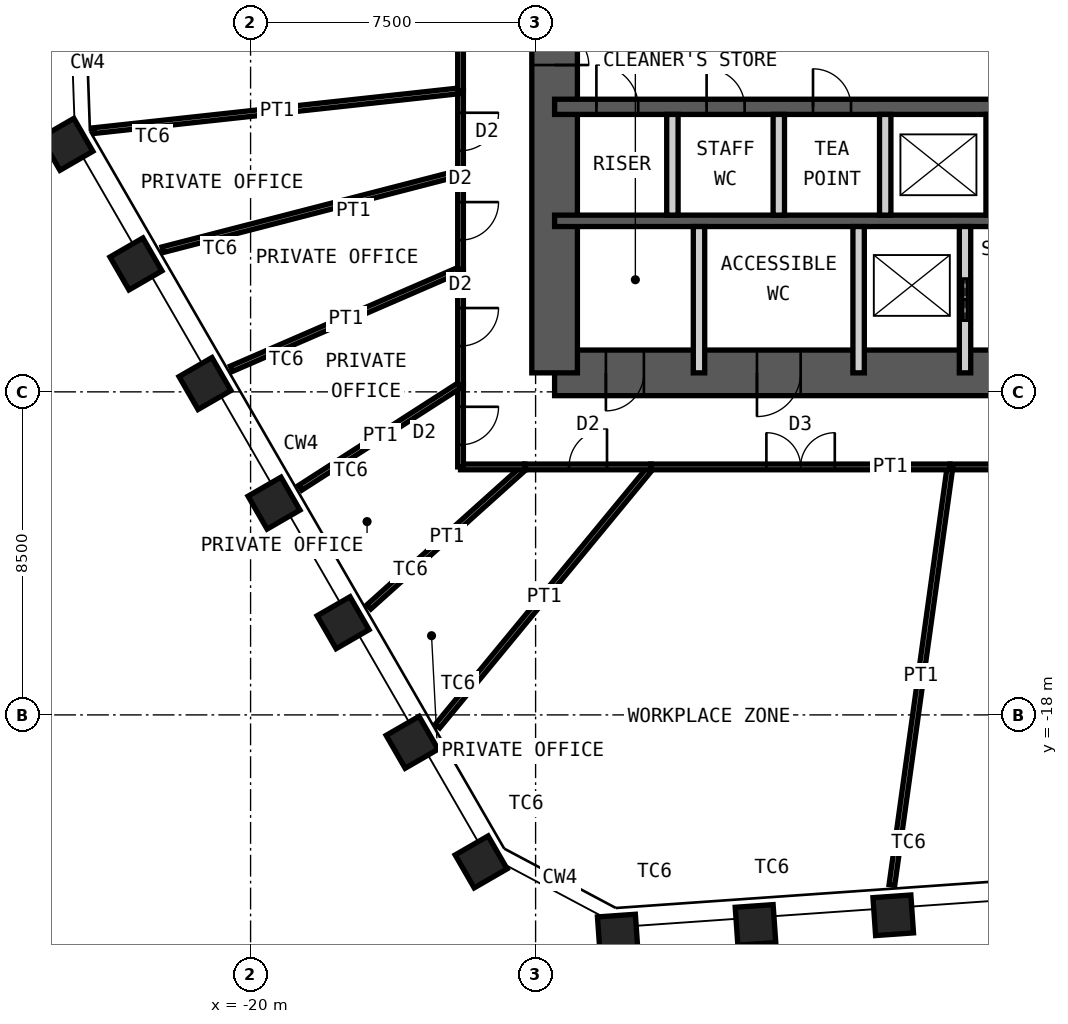
"""IFC4 building model, lengths in metres.
Left out: names, types, materials, properties, quantities, classifications, styles, units other than length and angle.
Written with IfcOpenShell. Run it as: python <this file> out.ifc"""

import sys

from ifc_helpers import new_model, si_unit, direction, frame, frame_2d, origin, origin_2d, place, context, subcontext, project, spatial, rectangle, hollow_rectangle, extrude, element, fill, save


model = new_model("IFC4")
c1 = context("Model", 3, precision=1e-05, world=origin(), true_north=direction((0.0, 1.0)))
c2 = subcontext(c1, "Body", "Model", "MODEL_VIEW")
j1 = project(units=[si_unit("LENGTHUNIT", "METRE"), si_unit("PLANEANGLEUNIT", "RADIAN")], contexts=[c1])
p1 = place(None, origin())
s1 = spatial("IfcSite", under=j1, at=p1, CompositionType="ELEMENT")
p2 = place(p1, origin())
s2 = spatial("IfcBuilding", under=s1, at=p2, CompositionType="ELEMENT")
p3 = place(p2, frame((0.0, 0.0, 239.2)))
s3 = spatial("IfcBuildingStorey", under=s2, at=p3, CompositionType="ELEMENT", Elevation=239.2)
for number, where, z_axis, x_axis in (
    (1, (-3.089, -23.272, 0.0), (0.0, 0.0, 1.0), (0.998, 0.07, 0.0)),
    (2, (-6.714, -23.526, 0.0), (0.0, 0.0, 1.0), (0.998, 0.07, 0.0)),
    (3, (-10.338, -23.779, 0.0), (0.0, 0.0, 1.0), (0.998, 0.07, 0.0)),
    (4, (-13.933, -21.868, 0.0), (0.0, 0.0, 1.0), (0.5, -0.866, 0.0)),
    (5, (-15.749, -18.721, 0.0), (0.0, 0.0, 1.0), (0.5, -0.866, 0.0)),
    (6, (-17.566, -15.574, 0.0), (0.0, 0.0, 1.0), (0.5, -0.866, 0.0)),
    (7, (-19.383, -12.428, 0.0), (0.0, 0.0, 1.0), (0.5, -0.866, 0.0)),
    (8, (-21.2, -9.281, 0.0), (0.0, 0.0, 1.0), (0.5, -0.866, 0.0)),
    (9, (-23.016, -6.134, 0.0), (0.0, 0.0, 1.0), (0.5, -0.866, 0.0)),
    (10, (-24.833, -2.988, 0.0), (0.0, 0.0, 1.0), (0.5, -0.866, 0.0)),
):
    element("IfcColumn", number, at=place(p3, frame(where, z_axis=z_axis, x_axis=x_axis)), inside=s3, PredefinedType="COLUMN", context=c2, shape_type="SweptSolid", body=[
        extrude(hollow_rectangle(XDim=1.0, YDim=1.0, WallThickness=0.06, at=origin_2d()), origin(), (0.0, 0.0, 1.0), 4.2),
    ])
p4 = place(p3, frame((-12.0, -9.0, 0.0), z_axis=(0.0, 0.0, 1.0), x_axis=(1.0, 0.0, 0.0)))
e11 = element("IfcWall", 11, at=p4, inside=s3, PredefinedType="SHEAR", context=c2, shape_type="SweptSolid", body=[
    extrude(rectangle(XDim=24.0, YDim=1.2, at=frame_2d((12.0, 0.0))), origin(), (0.0, 0.0, 1.0), 4.2),
])
p5 = place(p4, frame((1.35, 0.0, 0.0)))
e12 = element("IfcOpeningElement", 12, at=p5, cuts=e11, PredefinedType="OPENING", context=c2, shape_type="SweptSolid", body=[
    extrude(rectangle(XDim=1.0, YDim=2.1, at=frame_2d((0.5, 1.05))), frame((0.0, 0.61, 0.0), z_axis=(0.0, -1.0, 0.0), x_axis=(1.0, 0.0, 0.0)), (0.0, 0.0, 1.0), 1.22),
])
p6 = place(p4, frame((5.325, 0.0, 0.0)))
e13 = element("IfcOpeningElement", 13, at=p6, cuts=e11, PredefinedType="OPENING", context=c2, shape_type="SweptSolid", body=[
    extrude(rectangle(XDim=1.15, YDim=2.1, at=frame_2d((0.575, 1.05))), frame((0.0, 0.61, 0.0), z_axis=(0.0, -1.0, 0.0), x_axis=(1.0, 0.0, 0.0)), (0.0, 0.0, 1.0), 1.22),
])
p7 = place(p4, frame((12.6, 0.0, 0.0)))
e14 = element("IfcOpeningElement", 14, at=p7, cuts=e11, PredefinedType="OPENING", context=c2, shape_type="SweptSolid", body=[
    extrude(rectangle(XDim=1.0, YDim=2.1, at=frame_2d((0.5, 1.05))), frame((0.0, 0.61, 0.0), z_axis=(0.0, -1.0, 0.0), x_axis=(1.0, 0.0, 0.0)), (0.0, 0.0, 1.0), 1.22),
])
p8 = place(p3, frame((-12.0, -9.0, 0.0), z_axis=(0.0, 0.0, 1.0), x_axis=(0.0, 1.0, 0.0)))
e15 = element("IfcWall", 15, at=p8, inside=s3, PredefinedType="SHEAR", context=c2, shape_type="SweptSolid", body=[
    extrude(rectangle(XDim=18.0, YDim=1.2, at=frame_2d((9.0, 0.0))), origin(), (0.0, 0.0, 1.0), 4.2),
])
p9 = place(p8, frame((8.1, 0.0, 0.0)))
e16 = element("IfcOpeningElement", 16, at=p9, cuts=e15, PredefinedType="OPENING", context=c2, shape_type="SweptSolid", body=[
    extrude(rectangle(XDim=1.8, YDim=2.1, at=frame_2d((0.9, 1.05))), frame((0.0, 0.61, 0.0), z_axis=(0.0, -1.0, 0.0), x_axis=(1.0, 0.0, 0.0)), (0.0, 0.0, 1.0), 1.22),
])
p10 = place(p3, frame((-12.0, -2.0, 0.0), z_axis=(0.0, 0.0, 1.0), x_axis=(1.0, 0.0, 0.0)))
e17 = element("IfcWall", 17, at=p10, inside=s3, PredefinedType="SHEAR", context=c2, shape_type="SweptSolid", body=[
    extrude(rectangle(XDim=24.0, YDim=0.4, at=frame_2d((12.0, 0.0))), origin(), (0.0, 0.0, 1.0), 4.2),
])
p11 = place(p10, frame((1.1, 0.0, 0.0)))
e18 = element("IfcOpeningElement", 18, at=p11, cuts=e17, PredefinedType="OPENING", context=c2, shape_type="SweptSolid", body=[
    extrude(rectangle(XDim=1.1, YDim=2.1, at=frame_2d((0.55, 1.05))), frame((0.0, 0.21, 0.0), z_axis=(0.0, -1.0, 0.0), x_axis=(1.0, 0.0, 0.0)), (0.0, 0.0, 1.0), 0.42),
])
p12 = place(p10, frame((13.55, 0.0, 0.0)))
e19 = element("IfcOpeningElement", 19, at=p12, cuts=e17, PredefinedType="OPENING", context=c2, shape_type="SweptSolid", body=[
    extrude(rectangle(XDim=1.1, YDim=2.1, at=frame_2d((0.55, 1.05))), frame((0.0, 0.21, 0.0), z_axis=(0.0, -1.0, 0.0), x_axis=(1.0, 0.0, 0.0)), (0.0, 0.0, 1.0), 0.42),
])
p13 = place(p10, frame((20.7, 0.0, 0.0)))
e20 = element("IfcOpeningElement", 20, at=p13, cuts=e17, PredefinedType="OPENING", context=c2, shape_type="SweptSolid", body=[
    extrude(rectangle(XDim=1.1, YDim=2.1, at=frame_2d((0.55, 1.05))), frame((0.0, 0.21, 0.0), z_axis=(0.0, -1.0, 0.0), x_axis=(1.0, 0.0, 0.0)), (0.0, 0.0, 1.0), 0.42),
])
p14 = place(p10, frame((4.0, 0.0, 0.0)))
e21 = element("IfcOpeningElement", 21, at=p14, cuts=e17, PredefinedType="OPENING", context=c2, shape_type="SweptSolid", body=[
    extrude(rectangle(XDim=1.0, YDim=2.1, at=frame_2d((0.5, 1.05))), frame((0.0, 0.21, 0.0), z_axis=(0.0, -1.0, 0.0), x_axis=(1.0, 0.0, 0.0)), (0.0, 0.0, 1.0), 0.42),
])
p15 = place(p10, frame((6.8, 0.0, 0.0)))
e22 = element("IfcOpeningElement", 22, at=p15, cuts=e17, PredefinedType="OPENING", context=c2, shape_type="SweptSolid", body=[
    extrude(rectangle(XDim=1.0, YDim=2.1, at=frame_2d((0.5, 1.05))), frame((0.0, 0.21, 0.0), z_axis=(0.0, -1.0, 0.0), x_axis=(1.0, 0.0, 0.0)), (0.0, 0.0, 1.0), 0.42),
])
p16 = place(p3, frame((-12.0, -5.0, 0.0), z_axis=(0.0, 0.0, 1.0), x_axis=(1.0, 0.0, 0.0)))
e23 = element("IfcWall", 23, at=p16, inside=s3, PredefinedType="SHEAR", context=c2, shape_type="SweptSolid", body=[
    extrude(rectangle(XDim=24.0, YDim=0.3, at=frame_2d((12.0, 0.0))), origin(), (0.0, 0.0, 1.0), 4.2),
])
for number, where, z_axis, x_axis in (
    (24, (-8.9, -4.85, 0.0), (0.0, 0.0, 1.0), (0.0, 1.0, 0.0)),
    (25, (-6.1, -4.85, 0.0), (0.0, 0.0, 1.0), (0.0, 1.0, 0.0)),
    (26, (-3.3, -4.85, 0.0), (0.0, 0.0, 1.0), (0.0, 1.0, 0.0)),
    (27, (-0.5, -4.85, 0.0), (0.0, 0.0, 1.0), (0.0, 1.0, 0.0)),
):
    element("IfcWall", number, at=place(p3, frame(where, z_axis=z_axis, x_axis=x_axis)), inside=s3, PredefinedType="PARTITIONING", context=c2, shape_type="SweptSolid", body=[
        extrude(rectangle(XDim=2.65, YDim=0.3, at=frame_2d((1.325, 0.0))), origin(), (0.0, 0.0, 1.0), 3.98),
    ])
for number, where, z_axis, x_axis in (
    (28, (-8.2, -9.0, 0.0), (0.0, 0.0, 1.0), (0.0, 1.0, 0.0)),
    (29, (-4.0, -9.0, 0.0), (0.0, 0.0, 1.0), (0.0, 1.0, 0.0)),
):
    element("IfcWall", number, at=place(p3, frame(where, z_axis=z_axis, x_axis=x_axis)), inside=s3, PredefinedType="PARTITIONING", context=c2, shape_type="SweptSolid", body=[
        extrude(rectangle(XDim=3.85, YDim=0.3, at=frame_2d((1.925, 0.0))), origin(), (0.0, 0.0, 1.0), 3.98),
    ])
p17 = place(p3, frame((-1.2, -9.0, 0.0), z_axis=(0.0, 0.0, 1.0), x_axis=(0.0, 1.0, 0.0)))
e30 = element("IfcWall", 30, at=p17, inside=s3, PredefinedType="PARTITIONING", context=c2, shape_type="SweptSolid", body=[
    extrude(rectangle(XDim=3.85, YDim=0.3, at=frame_2d((1.925, 0.0))), origin(), (0.0, 0.0, 1.0), 3.98),
])
p18 = place(p17, frame((1.375, 0.0, 0.0)))
e31 = element("IfcOpeningElement", 31, at=p18, cuts=e30, PredefinedType="OPENING", context=c2, shape_type="SweptSolid", body=[
    extrude(rectangle(XDim=1.1, YDim=2.4, at=frame_2d((0.55, 1.2))), frame((0.0, 0.16, 0.0), z_axis=(0.0, -1.0, 0.0), x_axis=(1.0, 0.0, 0.0)), (0.0, 0.0, 1.0), 0.32),
])
p19 = place(p3, frame((-15.08, -18.294, 0.0), z_axis=(0.0, 0.0, 1.0), x_axis=(0.636052894953, 0.771645459277, 0.0)))
e32 = element("IfcWall", 32, at=p19, inside=s3, PredefinedType="PARTITIONING", context=c2, shape_type="SweptSolid", body=[
    extrude(rectangle(XDim=8.837, YDim=0.15, at=frame_2d((4.418, 0.0))), origin(), (0.0, 0.0, 1.0), 3.43),
])
p20 = place(p3, frame((-9.459, -11.475, 0.0), z_axis=(0.0, 0.0, 1.0), x_axis=(-1.0, 0.0, 0.0)))
e33 = element("IfcWall", 33, at=p20, inside=s3, PredefinedType="PARTITIONING", context=c2, shape_type="SweptSolid", body=[
    extrude(rectangle(XDim=3.324, YDim=0.15, at=frame_2d((1.662, 0.0))), origin(), (0.0, 0.0, 1.0), 4.03),
])
p21 = place(p20, frame((1.162, 0.0, 0.0)))
e34 = element("IfcOpeningElement", 34, at=p21, cuts=e33, PredefinedType="OPENING", context=c2, shape_type="SweptSolid", body=[
    extrude(rectangle(XDim=1.0, YDim=2.4, at=frame_2d((0.5, 1.2))), frame((0.0, 0.085, 0.0), z_axis=(0.0, -1.0, 0.0), x_axis=(1.0, 0.0, 0.0)), (0.0, 0.0, 1.0), 0.17),
])
p22 = place(p3, frame((-16.885, -15.158, 0.0), z_axis=(0.0, 0.0, 1.0), x_axis=(0.744165513773, 0.667995275515, 0.0)))
e35 = element("IfcWall", 35, at=p22, inside=s3, PredefinedType="PARTITIONING", context=c2, shape_type="SweptSolid", body=[
    extrude(rectangle(XDim=5.513, YDim=0.15, at=frame_2d((2.756, 0.0))), origin(), (0.0, 0.0, 1.0), 3.43),
])
p23 = place(p3, frame((-12.783, -11.475, 0.0), z_axis=(0.0, 0.0, 1.0), x_axis=(-1.0, 0.0, 0.0)))
e36 = element("IfcWall", 36, at=p23, inside=s3, PredefinedType="PARTITIONING", context=c2, shape_type="SweptSolid", body=[
    extrude(rectangle(XDim=1.692, YDim=0.15, at=frame_2d((0.846, 0.0))), origin(), (0.0, 0.0, 1.0), 4.03),
])
p24 = place(p3, frame((-14.475, -11.475, 0.0), z_axis=(0.0, 0.0, 1.0), x_axis=(0.0, 1.0, 0.0)))
e37 = element("IfcWall", 37, at=p24, inside=s3, PredefinedType="PARTITIONING", context=c2, shape_type="SweptSolid", body=[
    extrude(rectangle(XDim=2.164, YDim=0.15, at=frame_2d((1.082, 0.0))), origin(), (0.0, 0.0, 1.0), 4.03),
])
p25 = place(p24, frame((0.582, 0.0, 0.0)))
e38 = element("IfcOpeningElement", 38, at=p25, cuts=e37, PredefinedType="OPENING", context=c2, shape_type="SweptSolid", body=[
    extrude(rectangle(XDim=1.0, YDim=2.4, at=frame_2d((0.5, 1.2))), frame((0.0, 0.085, 0.0), z_axis=(0.0, -1.0, 0.0), x_axis=(1.0, 0.0, 0.0)), (0.0, 0.0, 1.0), 0.17),
])
p26 = place(p3, frame((-18.693, -12.024, 0.0), z_axis=(0.0, 0.0, 1.0), x_axis=(0.841031335058, 0.540986407824, 0.0)))
e39 = element("IfcWall", 39, at=p26, inside=s3, PredefinedType="PARTITIONING", context=c2, shape_type="SweptSolid", body=[
    extrude(rectangle(XDim=5.015, YDim=0.15, at=frame_2d((2.507, 0.0))), origin(), (0.0, 0.0, 1.0), 3.43),
])
p27 = place(p3, frame((-14.475, -9.311, 0.0), z_axis=(0.0, 0.0, 1.0), x_axis=(0.0, 1.0, 0.0)))
e40 = element("IfcWall", 40, at=p27, inside=s3, PredefinedType="PARTITIONING", context=c2, shape_type="SweptSolid", body=[
    extrude(rectangle(XDim=3.033, YDim=0.15, at=frame_2d((1.517, 0.0))), origin(), (0.0, 0.0, 1.0), 4.03),
])
p28 = place(p27, frame((1.017, 0.0, 0.0)))
e41 = element("IfcOpeningElement", 41, at=p28, cuts=e40, PredefinedType="OPENING", context=c2, shape_type="SweptSolid", body=[
    extrude(rectangle(XDim=1.0, YDim=2.4, at=frame_2d((0.5, 1.2))), frame((0.0, 0.085, 0.0), z_axis=(0.0, -1.0, 0.0), x_axis=(1.0, 0.0, 0.0)), (0.0, 0.0, 1.0), 0.17),
])
p29 = place(p3, frame((-20.502, -8.891, 0.0), z_axis=(0.0, 0.0, 1.0), x_axis=(0.917431289744, 0.397894242982, 0.0)))
e42 = element("IfcWall", 42, at=p29, inside=s3, PredefinedType="PARTITIONING", context=c2, shape_type="SweptSolid", body=[
    extrude(rectangle(XDim=6.569, YDim=0.15, at=frame_2d((3.285, 0.0))), origin(), (0.0, 0.0, 1.0), 3.43),
])
p30 = place(p3, frame((-14.475, -6.278, 0.0), z_axis=(0.0, 0.0, 1.0), x_axis=(0.0, 1.0, 0.0)))
e43 = element("IfcWall", 43, at=p30, inside=s3, PredefinedType="PARTITIONING", context=c2, shape_type="SweptSolid", body=[
    extrude(rectangle(XDim=2.542, YDim=0.15, at=frame_2d((1.271, 0.0))), origin(), (0.0, 0.0, 1.0), 4.03),
])
p31 = place(p30, frame((0.771, 0.0, 0.0)))
e44 = element("IfcOpeningElement", 44, at=p31, cuts=e43, PredefinedType="OPENING", context=c2, shape_type="SweptSolid", body=[
    extrude(rectangle(XDim=1.0, YDim=2.4, at=frame_2d((0.5, 1.2))), frame((0.0, 0.085, 0.0), z_axis=(0.0, -1.0, 0.0), x_axis=(1.0, 0.0, 0.0)), (0.0, 0.0, 1.0), 0.17),
])
p32 = place(p3, frame((-22.313, -5.759, 0.0), z_axis=(0.0, 0.0, 1.0), x_axis=(0.968265788926, 0.249922712042, 0.0)))
e45 = element("IfcWall", 45, at=p32, inside=s3, PredefinedType="PARTITIONING", context=c2, shape_type="SweptSolid", body=[
    extrude(rectangle(XDim=8.095, YDim=0.15, at=frame_2d((4.048, 0.0))), origin(), (0.0, 0.0, 1.0), 3.43),
])
p33 = place(p3, frame((-14.475, -3.736, 0.0), z_axis=(0.0, 0.0, 1.0), x_axis=(0.0, 1.0, 0.0)))
e46 = element("IfcWall", 46, at=p33, inside=s3, PredefinedType="PARTITIONING", context=c2, shape_type="SweptSolid", body=[
    extrude(rectangle(XDim=2.16, YDim=0.15, at=frame_2d((1.08, 0.0))), origin(), (0.0, 0.0, 1.0), 4.03),
])
p34 = place(p33, frame((0.58, 0.0, 0.0)))
e47 = element("IfcOpeningElement", 47, at=p34, cuts=e46, PredefinedType="OPENING", context=c2, shape_type="SweptSolid", body=[
    extrude(rectangle(XDim=1.0, YDim=2.4, at=frame_2d((0.5, 1.2))), frame((0.0, 0.085, 0.0), z_axis=(0.0, -1.0, 0.0), x_axis=(1.0, 0.0, 0.0)), (0.0, 0.0, 1.0), 0.17),
])
p35 = place(p3, frame((-24.128, -2.627, 0.0), z_axis=(0.0, 0.0, 1.0), x_axis=(0.994126892449, 0.108220708326, 0.0)))
e48 = element("IfcWall", 48, at=p35, inside=s3, PredefinedType="PARTITIONING", context=c2, shape_type="SweptSolid", body=[
    extrude(rectangle(XDim=9.71, YDim=0.15, at=frame_2d((4.855, 0.0))), origin(), (0.0, 0.0, 1.0), 2.93),
])
p36 = place(p3, frame((-14.475, -1.576, 0.0), z_axis=(0.0, 0.0, 1.0), x_axis=(0.0, 1.0, 0.0)))
e49 = element("IfcWall", 49, at=p36, inside=s3, PredefinedType="PARTITIONING", context=c2, shape_type="SweptSolid", body=[
    extrude(rectangle(XDim=4.252, YDim=0.15, at=frame_2d((2.126, 0.0))), origin(), (0.0, 0.0, 1.0), 4.03),
])
p37 = place(p36, frame((1.626, 0.0, 0.0)))
e50 = element("IfcOpeningElement", 50, at=p37, cuts=e49, PredefinedType="OPENING", context=c2, shape_type="SweptSolid", body=[
    extrude(rectangle(XDim=1.0, YDim=2.4, at=frame_2d((0.5, 1.2))), frame((0.0, 0.085, 0.0), z_axis=(0.0, -1.0, 0.0), x_axis=(1.0, 0.0, 0.0)), (0.0, 0.0, 1.0), 0.17),
])
p38 = place(p3, frame((4.07, -11.475, 0.0), z_axis=(0.0, 0.0, 1.0), x_axis=(-1.0, 0.0, 0.0)))
e51 = element("IfcWall", 51, at=p38, inside=s3, PredefinedType="PARTITIONING", context=c2, shape_type="SweptSolid", body=[
    extrude(rectangle(XDim=5.665, YDim=0.15, at=frame_2d((2.832, 0.0))), origin(), (0.0, 0.0, 1.0), 4.03),
])
p39 = place(p38, frame((1.932, 0.0, 0.0)))
e52 = element("IfcOpeningElement", 52, at=p39, cuts=e51, PredefinedType="OPENING", context=c2, shape_type="SweptSolid", body=[
    extrude(rectangle(XDim=1.8, YDim=2.4, at=frame_2d((0.9, 1.2))), frame((0.0, 0.085, 0.0), z_axis=(0.0, -1.0, 0.0), x_axis=(1.0, 0.0, 0.0)), (0.0, 0.0, 1.0), 0.17),
])
p40 = place(p3, frame((-3.124, -22.475, 0.0), z_axis=(0.0, 0.0, 1.0), x_axis=(0.137683997015, 0.990476207168, 0.0)))
e53 = element("IfcWall", 53, at=p40, inside=s3, PredefinedType="PARTITIONING", context=c2, shape_type="SweptSolid", body=[
    extrude(rectangle(XDim=11.105, YDim=0.15, at=frame_2d((5.553, 0.0))), origin(), (0.0, 0.0, 1.0), 3.43),
])
p41 = place(p3, frame((-1.595, -11.475, 0.0), z_axis=(0.0, 0.0, 1.0), x_axis=(-1.0, 0.0, 0.0)))
e54 = element("IfcWall", 54, at=p41, inside=s3, PredefinedType="PARTITIONING", context=c2, shape_type="SweptSolid", body=[
    extrude(rectangle(XDim=7.864, YDim=0.15, at=frame_2d((3.932, 0.0))), origin(), (0.0, 0.0, 1.0), 4.03),
])
p42 = place(p41, frame((3.032, 0.0, 0.0)))
e55 = element("IfcOpeningElement", 55, at=p42, cuts=e54, PredefinedType="OPENING", context=c2, shape_type="SweptSolid", body=[
    extrude(rectangle(XDim=1.8, YDim=2.4, at=frame_2d((0.9, 1.2))), frame((0.0, 0.085, 0.0), z_axis=(0.0, -1.0, 0.0), x_axis=(1.0, 0.0, 0.0)), (0.0, 0.0, 1.0), 0.17),
])
p43 = place(p5, origin())
e56 = element("IfcDoor", 56, at=p43, inside=s3, OperationType="SINGLE_SWING_LEFT", PredefinedType="DOOR", context=c2, shape_type="SweptSolid", body=[
    extrude(rectangle(XDim=1.0, YDim=2.1, at=frame_2d((0.5, 1.05))), frame((0.0, 0.025, 0.0), z_axis=(0.0, -1.0, 0.0), x_axis=(1.0, 0.0, 0.0)), (0.0, 0.0, 1.0), 0.05),
])
fill(e12, e56)
p44 = place(p6, origin())
e57 = element("IfcDoor", 57, at=p44, inside=s3, OperationType="SINGLE_SWING_LEFT", PredefinedType="DOOR", context=c2, shape_type="SweptSolid", body=[
    extrude(rectangle(XDim=1.15, YDim=2.1, at=frame_2d((0.575, 1.05))), frame((0.0, 0.025, 0.0), z_axis=(0.0, -1.0, 0.0), x_axis=(1.0, 0.0, 0.0)), (0.0, 0.0, 1.0), 0.05),
])
fill(e13, e57)
p45 = place(p11, origin())
e58 = element("IfcDoor", 58, at=p45, inside=s3, OperationType="SINGLE_SWING_RIGHT", PredefinedType="DOOR", context=c2, shape_type="SweptSolid", body=[
    extrude(rectangle(XDim=1.1, YDim=2.1, at=frame_2d((0.55, 1.05))), frame((0.0, 0.025, 0.0), z_axis=(0.0, -1.0, 0.0), x_axis=(1.0, 0.0, 0.0)), (0.0, 0.0, 1.0), 0.05),
])
fill(e18, e58)
p46 = place(p9, origin())
e59 = element("IfcDoor", 59, at=p46, inside=s3, OperationType="DOUBLE_DOOR_DOUBLE_SWING", PredefinedType="DOOR", context=c2, shape_type="SweptSolid", body=[
    extrude(rectangle(XDim=1.8, YDim=2.1, at=frame_2d((0.9, 1.05))), frame((0.0, 0.025, 0.0), z_axis=(0.0, -1.0, 0.0), x_axis=(1.0, 0.0, 0.0)), (0.0, 0.0, 1.0), 0.05),
])
fill(e16, e59)
p47 = place(p18, origin())
e60 = element("IfcDoor", 60, at=p47, inside=s3, OperationType="DOUBLE_DOOR_SLIDING", PredefinedType="DOOR", context=c2, shape_type="SweptSolid", body=[
    extrude(rectangle(XDim=1.1, YDim=2.4, at=frame_2d((0.55, 1.2))), frame((0.0, 0.025, 0.0), z_axis=(0.0, -1.0, 0.0), x_axis=(1.0, 0.0, 0.0)), (0.0, 0.0, 1.0), 0.05),
])
fill(e31, e60)
p48 = place(p14, origin())
e61 = element("IfcDoor", 61, at=p48, inside=s3, OperationType="SINGLE_SWING_RIGHT", PredefinedType="DOOR", context=c2, shape_type="SweptSolid", body=[
    extrude(rectangle(XDim=1.0, YDim=2.1, at=frame_2d((0.5, 1.05))), frame((0.0, 0.025, 0.0), z_axis=(0.0, -1.0, 0.0), x_axis=(1.0, 0.0, 0.0)), (0.0, 0.0, 1.0), 0.05),
])
fill(e21, e61)
p49 = place(p15, origin())
e62 = element("IfcDoor", 62, at=p49, inside=s3, OperationType="SINGLE_SWING_RIGHT", PredefinedType="DOOR", context=c2, shape_type="SweptSolid", body=[
    extrude(rectangle(XDim=1.0, YDim=2.1, at=frame_2d((0.5, 1.05))), frame((0.0, 0.025, 0.0), z_axis=(0.0, -1.0, 0.0), x_axis=(1.0, 0.0, 0.0)), (0.0, 0.0, 1.0), 0.05),
])
fill(e22, e62)
p50 = place(p21, origin())
e63 = element("IfcDoor", 63, at=p50, inside=s3, OperationType="SINGLE_SWING_LEFT", PredefinedType="DOOR", context=c2, shape_type="SweptSolid", body=[
    extrude(rectangle(XDim=1.0, YDim=2.4, at=frame_2d((0.5, 1.2))), frame((0.0, 0.025, 0.0), z_axis=(0.0, -1.0, 0.0), x_axis=(1.0, 0.0, 0.0)), (0.0, 0.0, 1.0), 0.05),
])
fill(e34, e63)
p51 = place(p25, origin())
e64 = element("IfcDoor", 64, at=p51, inside=s3, OperationType="SINGLE_SWING_RIGHT", PredefinedType="DOOR", context=c2, shape_type="SweptSolid", body=[
    extrude(rectangle(XDim=1.0, YDim=2.4, at=frame_2d((0.5, 1.2))), frame((0.0, 0.025, 0.0), z_axis=(0.0, -1.0, 0.0), x_axis=(1.0, 0.0, 0.0)), (0.0, 0.0, 1.0), 0.05),
])
fill(e38, e64)
p52 = place(p28, origin())
e65 = element("IfcDoor", 65, at=p52, inside=s3, OperationType="SINGLE_SWING_RIGHT", PredefinedType="DOOR", context=c2, shape_type="SweptSolid", body=[
    extrude(rectangle(XDim=1.0, YDim=2.4, at=frame_2d((0.5, 1.2))), frame((0.0, 0.025, 0.0), z_axis=(0.0, -1.0, 0.0), x_axis=(1.0, 0.0, 0.0)), (0.0, 0.0, 1.0), 0.05),
])
fill(e41, e65)
p53 = place(p31, origin())
e66 = element("IfcDoor", 66, at=p53, inside=s3, OperationType="SINGLE_SWING_RIGHT", PredefinedType="DOOR", context=c2, shape_type="SweptSolid", body=[
    extrude(rectangle(XDim=1.0, YDim=2.4, at=frame_2d((0.5, 1.2))), frame((0.0, 0.025, 0.0), z_axis=(0.0, -1.0, 0.0), x_axis=(1.0, 0.0, 0.0)), (0.0, 0.0, 1.0), 0.05),
])
fill(e44, e66)
p54 = place(p34, origin())
e67 = element("IfcDoor", 67, at=p54, inside=s3, OperationType="SINGLE_SWING_RIGHT", PredefinedType="DOOR", context=c2, shape_type="SweptSolid", body=[
    extrude(rectangle(XDim=1.0, YDim=2.4, at=frame_2d((0.5, 1.2))), frame((0.0, 0.025, 0.0), z_axis=(0.0, -1.0, 0.0), x_axis=(1.0, 0.0, 0.0)), (0.0, 0.0, 1.0), 0.05),
])
fill(e47, e67)
p55 = place(p42, origin())
e68 = element("IfcDoor", 68, at=p55, inside=s3, OperationType="DOUBLE_DOOR_DOUBLE_SWING", PredefinedType="DOOR", context=c2, shape_type="SweptSolid", body=[
    extrude(rectangle(XDim=1.8, YDim=2.4, at=frame_2d((0.9, 1.2))), frame((0.0, 0.025, 0.0), z_axis=(0.0, -1.0, 0.0), x_axis=(1.0, 0.0, 0.0)), (0.0, 0.0, 1.0), 0.05),
])
fill(e55, e68)
save(model, sys.argv[1])
